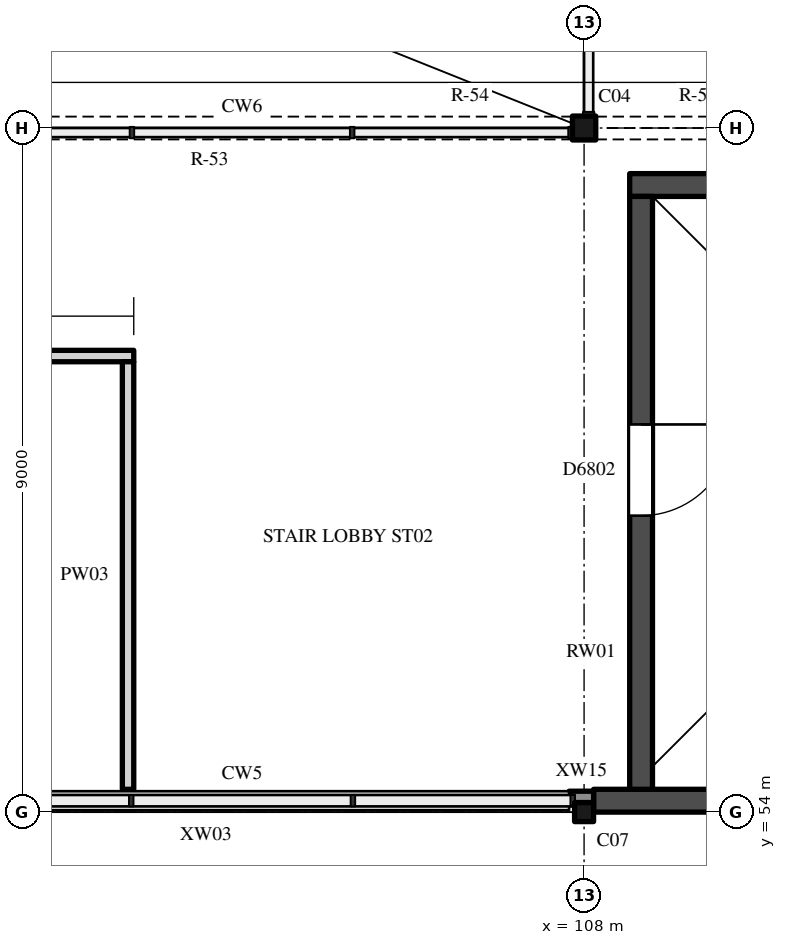
"""IFC4 building model, lengths in metres.
Left out: names, types, materials, properties, quantities, classifications, styles, units other than length and angle.
Written with IfcOpenShell. Run it as: python <this file> out.ifc"""

import sys

from ifc_helpers import new_model, si_unit, direction, frame, frame_2d, origin, origin_2d, place, context, subcontext, project, spatial, polyline, rectangle, hollow_rectangle, i_section, outline, extrude, element, fill, save


model = new_model("IFC4")
c1 = context("Model", 3, precision=1e-05, world=origin(), true_north=direction((0.0, 1.0)))
c2 = subcontext(c1, "Body", "Model", "MODEL_VIEW")
j1 = project(units=[si_unit("LENGTHUNIT", "METRE"), si_unit("PLANEANGLEUNIT", "RADIAN")], contexts=[c1])
p1 = place(None, origin())
s1 = spatial("IfcSite", under=j1, at=p1, CompositionType="ELEMENT")
p2 = place(p1, origin())
s2 = spatial("IfcBuilding", under=s1, at=p2, CompositionType="ELEMENT")
p3 = place(p2, frame((0.0, 0.0, 36.0)))
s3 = spatial("IfcBuildingStorey", under=s2, at=p3, CompositionType="ELEMENT", Elevation=36.0)
p4 = place(p3, frame((108.0, 54.0, 0.0), z_axis=(0.0, 0.0, 1.0), x_axis=(1.0, 0.0, 0.0)))
e1 = element("IfcColumn", 1, at=p4, inside=s3, PredefinedType="COLUMN", context=c2, shape_type="SweptSolid", body=[
    extrude(hollow_rectangle(XDim=0.25, YDim=0.25, WallThickness=0.009, InnerFilletRadius=0.013, OuterFilletRadius=0.022, at=origin_2d()), origin(), (0.0, 0.0, 1.0), 8.0),
])
p5 = place(p3, frame((108.0, 63.0, 0.0), z_axis=(0.0, 0.0, 1.0), x_axis=(1.0, 0.0, 0.0)))
e2 = element("IfcColumn", 2, at=p5, inside=s3, PredefinedType="COLUMN", context=c2, shape_type="SweptSolid", body=[
    extrude(i_section(OverallWidth=0.307, OverallDepth=0.315, WebThickness=0.012, FlangeThickness=0.019, FilletRadius=0.017, at=origin_2d()), origin(), (0.0, 0.0, 1.0), 8.0),
])
p6 = place(p3, frame((108.125, 54.15, 0.0), z_axis=(0.0, 0.0, 1.0), x_axis=(1.0, 0.0, 0.0)))
e3 = element("IfcWall", 3, at=p6, inside=s3, PredefinedType="SHEAR", context=c2, shape_type="SweptSolid", body=[
    extrude(rectangle(XDim=8.575, YDim=0.3, at=frame_2d((4.288, 0.0))), origin(), (0.0, 0.0, 1.0), 7.864),
])
p7 = place(p3, frame((108.6, 62.25, 0.0), z_axis=(0.0, 0.0, 1.0), x_axis=(1.0, 0.0, 0.0)))
e4 = element("IfcWall", 4, at=p7, inside=s3, PredefinedType="SHEAR", context=c2, shape_type="SweptSolid", body=[
    extrude(rectangle(XDim=8.1, YDim=0.3, at=frame_2d((4.05, 0.0))), origin(), (0.0, 0.0, 1.0), 14.344),
])
p8 = place(p3, frame((108.75, 54.3, 0.0), z_axis=(0.0, 0.0, 1.0), x_axis=(0.0, 1.0, 0.0)))
e5 = element("IfcWall", 5, at=p8, inside=s3, PredefinedType="SHEAR", context=c2, shape_type="SweptSolid", body=[
    extrude(outline(polyline([(0.0, 0.0), (7.8, 0.0), (7.8, 14.224), (0.0, 7.984), (0.0, 0.0)])), frame((0.0, 0.15, 0.0), z_axis=(0.0, -1.0, 0.0), x_axis=(1.0, 0.0, 0.0)), (0.0, 0.0, 1.0), 0.3),
])
p9 = place(p8, frame((3.6, 0.0, 0.0)))
e6 = element("IfcOpeningElement", 6, at=p9, cuts=e5, PredefinedType="OPENING", context=c2, shape_type="SweptSolid", body=[
    extrude(rectangle(XDim=1.2, YDim=2.1, at=frame_2d((0.6, 1.05))), frame((0.0, 0.16, 0.0), z_axis=(0.0, -1.0, 0.0), x_axis=(1.0, 0.0, 0.0)), (0.0, 0.0, 1.0), 0.32),
])
p10 = place(p3, frame((99.161, 54.15, 0.0), z_axis=(0.0, 0.0, 1.0), x_axis=(1.0, 0.0, 0.0)))
e7 = element("IfcWall", 7, at=p10, inside=s3, PredefinedType="SOLIDWALL", context=c2, shape_type="SweptSolid", body=[
    extrude(rectangle(XDim=8.642, YDim=0.25, at=frame_2d((4.321, 0.0))), origin(), (0.0, 0.0, 1.0), 1.1),
])
p11 = place(p3, frame((107.803, 54.2, 0.0), z_axis=(0.0, 0.0, 1.0), x_axis=(1.0, 0.0, 0.0)))
e8 = element("IfcWall", 8, at=p11, inside=s3, PredefinedType="SOLIDWALL", context=c2, shape_type="SweptSolid", body=[
    extrude(rectangle(XDim=0.322, YDim=0.15, at=frame_2d((0.161, 0.0))), origin(), (0.0, 0.0, 1.0), 7.864),
])
p12 = place(p3, frame((54.15, 63.0, 15.2), z_axis=(0.0, 0.0, 1.0), x_axis=(1.0, 0.0, 0.0)))
e9 = element("IfcWall", 9, at=p12, inside=s3, PredefinedType="SOLIDWALL", context=c2, shape_type="SweptSolid", body=[
    extrude(rectangle(XDim=62.7, YDim=0.3, at=frame_2d((31.35, 0.0))), origin(), (0.0, 0.0, 1.0), 0.9),
])
p13 = place(p12, frame((0.15, 0.0, 0.15)))
e10 = element("IfcOpeningElement", 10, at=p13, cuts=e9, PredefinedType="OPENING", context=c2, shape_type="SweptSolid", body=[
    extrude(rectangle(XDim=2.4, YDim=0.6, at=frame_2d((1.2, 0.3))), frame((0.0, 0.16, 0.0), z_axis=(0.0, -1.0, 0.0), x_axis=(1.0, 0.0, 0.0)), (0.0, 0.0, 1.0), 0.32),
])
p14 = place(p12, frame((3.15, 0.0, 0.15)))
e11 = element("IfcOpeningElement", 11, at=p14, cuts=e9, PredefinedType="OPENING", context=c2, shape_type="SweptSolid", body=[
    extrude(rectangle(XDim=2.4, YDim=0.6, at=frame_2d((1.2, 0.3))), frame((0.0, 0.16, 0.0), z_axis=(0.0, -1.0, 0.0), x_axis=(1.0, 0.0, 0.0)), (0.0, 0.0, 1.0), 0.32),
])
p15 = place(p12, frame((6.15, 0.0, 0.15)))
e12 = element("IfcOpeningElement", 12, at=p15, cuts=e9, PredefinedType="OPENING", context=c2, shape_type="SweptSolid", body=[
    extrude(rectangle(XDim=2.4, YDim=0.6, at=frame_2d((1.2, 0.3))), frame((0.0, 0.16, 0.0), z_axis=(0.0, -1.0, 0.0), x_axis=(1.0, 0.0, 0.0)), (0.0, 0.0, 1.0), 0.32),
])
p16 = place(p12, frame((9.15, 0.0, 0.15)))
e13 = element("IfcOpeningElement", 13, at=p16, cuts=e9, PredefinedType="OPENING", context=c2, shape_type="SweptSolid", body=[
    extrude(rectangle(XDim=2.4, YDim=0.6, at=frame_2d((1.2, 0.3))), frame((0.0, 0.16, 0.0), z_axis=(0.0, -1.0, 0.0), x_axis=(1.0, 0.0, 0.0)), (0.0, 0.0, 1.0), 0.32),
])
p17 = place(p12, frame((12.15, 0.0, 0.15)))
e14 = element("IfcOpeningElement", 14, at=p17, cuts=e9, PredefinedType="OPENING", context=c2, shape_type="SweptSolid", body=[
    extrude(rectangle(XDim=2.4, YDim=0.6, at=frame_2d((1.2, 0.3))), frame((0.0, 0.16, 0.0), z_axis=(0.0, -1.0, 0.0), x_axis=(1.0, 0.0, 0.0)), (0.0, 0.0, 1.0), 0.32),
])
p18 = place(p12, frame((15.15, 0.0, 0.15)))
e15 = element("IfcOpeningElement", 15, at=p18, cuts=e9, PredefinedType="OPENING", context=c2, shape_type="SweptSolid", body=[
    extrude(rectangle(XDim=2.4, YDim=0.6, at=frame_2d((1.2, 0.3))), frame((0.0, 0.16, 0.0), z_axis=(0.0, -1.0, 0.0), x_axis=(1.0, 0.0, 0.0)), (0.0, 0.0, 1.0), 0.32),
])
p19 = place(p12, frame((18.15, 0.0, 0.15)))
e16 = element("IfcOpeningElement", 16, at=p19, cuts=e9, PredefinedType="OPENING", context=c2, shape_type="SweptSolid", body=[
    extrude(rectangle(XDim=2.4, YDim=0.6, at=frame_2d((1.2, 0.3))), frame((0.0, 0.16, 0.0), z_axis=(0.0, -1.0, 0.0), x_axis=(1.0, 0.0, 0.0)), (0.0, 0.0, 1.0), 0.32),
])
p20 = place(p12, frame((21.15, 0.0, 0.15)))
e17 = element("IfcOpeningElement", 17, at=p20, cuts=e9, PredefinedType="OPENING", context=c2, shape_type="SweptSolid", body=[
    extrude(rectangle(XDim=2.4, YDim=0.6, at=frame_2d((1.2, 0.3))), frame((0.0, 0.16, 0.0), z_axis=(0.0, -1.0, 0.0), x_axis=(1.0, 0.0, 0.0)), (0.0, 0.0, 1.0), 0.32),
])
p21 = place(p12, frame((24.15, 0.0, 0.15)))
e18 = element("IfcOpeningElement", 18, at=p21, cuts=e9, PredefinedType="OPENING", context=c2, shape_type="SweptSolid", body=[
    extrude(rectangle(XDim=2.4, YDim=0.6, at=frame_2d((1.2, 0.3))), frame((0.0, 0.16, 0.0), z_axis=(0.0, -1.0, 0.0), x_axis=(1.0, 0.0, 0.0)), (0.0, 0.0, 1.0), 0.32),
])
p22 = place(p12, frame((27.15, 0.0, 0.15)))
e19 = element("IfcOpeningElement", 19, at=p22, cuts=e9, PredefinedType="OPENING", context=c2, shape_type="SweptSolid", body=[
    extrude(rectangle(XDim=2.4, YDim=0.6, at=frame_2d((1.2, 0.3))), frame((0.0, 0.16, 0.0), z_axis=(0.0, -1.0, 0.0), x_axis=(1.0, 0.0, 0.0)), (0.0, 0.0, 1.0), 0.32),
])
p23 = place(p12, frame((30.15, 0.0, 0.15)))
e20 = element("IfcOpeningElement", 20, at=p23, cuts=e9, PredefinedType="OPENING", context=c2, shape_type="SweptSolid", body=[
    extrude(rectangle(XDim=2.4, YDim=0.6, at=frame_2d((1.2, 0.3))), frame((0.0, 0.16, 0.0), z_axis=(0.0, -1.0, 0.0), x_axis=(1.0, 0.0, 0.0)), (0.0, 0.0, 1.0), 0.32),
])
p24 = place(p12, frame((33.15, 0.0, 0.15)))
e21 = element("IfcOpeningElement", 21, at=p24, cuts=e9, PredefinedType="OPENING", context=c2, shape_type="SweptSolid", body=[
    extrude(rectangle(XDim=2.4, YDim=0.6, at=frame_2d((1.2, 0.3))), frame((0.0, 0.16, 0.0), z_axis=(0.0, -1.0, 0.0), x_axis=(1.0, 0.0, 0.0)), (0.0, 0.0, 1.0), 0.32),
])
p25 = place(p12, frame((36.15, 0.0, 0.15)))
e22 = element("IfcOpeningElement", 22, at=p25, cuts=e9, PredefinedType="OPENING", context=c2, shape_type="SweptSolid", body=[
    extrude(rectangle(XDim=2.4, YDim=0.6, at=frame_2d((1.2, 0.3))), frame((0.0, 0.16, 0.0), z_axis=(0.0, -1.0, 0.0), x_axis=(1.0, 0.0, 0.0)), (0.0, 0.0, 1.0), 0.32),
])
p26 = place(p12, frame((39.15, 0.0, 0.15)))
e23 = element("IfcOpeningElement", 23, at=p26, cuts=e9, PredefinedType="OPENING", context=c2, shape_type="SweptSolid", body=[
    extrude(rectangle(XDim=2.4, YDim=0.6, at=frame_2d((1.2, 0.3))), frame((0.0, 0.16, 0.0), z_axis=(0.0, -1.0, 0.0), x_axis=(1.0, 0.0, 0.0)), (0.0, 0.0, 1.0), 0.32),
])
p27 = place(p12, frame((42.15, 0.0, 0.15)))
e24 = element("IfcOpeningElement", 24, at=p27, cuts=e9, PredefinedType="OPENING", context=c2, shape_type="SweptSolid", body=[
    extrude(rectangle(XDim=2.4, YDim=0.6, at=frame_2d((1.2, 0.3))), frame((0.0, 0.16, 0.0), z_axis=(0.0, -1.0, 0.0), x_axis=(1.0, 0.0, 0.0)), (0.0, 0.0, 1.0), 0.32),
])
p28 = place(p12, frame((45.15, 0.0, 0.15)))
e25 = element("IfcOpeningElement", 25, at=p28, cuts=e9, PredefinedType="OPENING", context=c2, shape_type="SweptSolid", body=[
    extrude(rectangle(XDim=2.4, YDim=0.6, at=frame_2d((1.2, 0.3))), frame((0.0, 0.16, 0.0), z_axis=(0.0, -1.0, 0.0), x_axis=(1.0, 0.0, 0.0)), (0.0, 0.0, 1.0), 0.32),
])
p29 = place(p12, frame((48.15, 0.0, 0.15)))
e26 = element("IfcOpeningElement", 26, at=p29, cuts=e9, PredefinedType="OPENING", context=c2, shape_type="SweptSolid", body=[
    extrude(rectangle(XDim=2.4, YDim=0.6, at=frame_2d((1.2, 0.3))), frame((0.0, 0.16, 0.0), z_axis=(0.0, -1.0, 0.0), x_axis=(1.0, 0.0, 0.0)), (0.0, 0.0, 1.0), 0.32),
])
p30 = place(p12, frame((51.15, 0.0, 0.15)))
e27 = element("IfcOpeningElement", 27, at=p30, cuts=e9, PredefinedType="OPENING", context=c2, shape_type="SweptSolid", body=[
    extrude(rectangle(XDim=2.4, YDim=0.6, at=frame_2d((1.2, 0.3))), frame((0.0, 0.16, 0.0), z_axis=(0.0, -1.0, 0.0), x_axis=(1.0, 0.0, 0.0)), (0.0, 0.0, 1.0), 0.32),
])
p31 = place(p12, frame((54.15, 0.0, 0.15)))
e28 = element("IfcOpeningElement", 28, at=p31, cuts=e9, PredefinedType="OPENING", context=c2, shape_type="SweptSolid", body=[
    extrude(rectangle(XDim=2.4, YDim=0.6, at=frame_2d((1.2, 0.3))), frame((0.0, 0.16, 0.0), z_axis=(0.0, -1.0, 0.0), x_axis=(1.0, 0.0, 0.0)), (0.0, 0.0, 1.0), 0.32),
])
p32 = place(p12, frame((57.15, 0.0, 0.15)))
e29 = element("IfcOpeningElement", 29, at=p32, cuts=e9, PredefinedType="OPENING", context=c2, shape_type="SweptSolid", body=[
    extrude(rectangle(XDim=2.4, YDim=0.6, at=frame_2d((1.2, 0.3))), frame((0.0, 0.16, 0.0), z_axis=(0.0, -1.0, 0.0), x_axis=(1.0, 0.0, 0.0)), (0.0, 0.0, 1.0), 0.32),
])
p33 = place(p12, frame((60.15, 0.0, 0.15)))
e30 = element("IfcOpeningElement", 30, at=p33, cuts=e9, PredefinedType="OPENING", context=c2, shape_type="SweptSolid", body=[
    extrude(rectangle(XDim=2.4, YDim=0.6, at=frame_2d((1.2, 0.3))), frame((0.0, 0.16, 0.0), z_axis=(0.0, -1.0, 0.0), x_axis=(1.0, 0.0, 0.0)), (0.0, 0.0, 1.0), 0.32),
])
p34 = place(p3, frame((68.925, 60.0, 0.0), z_axis=(0.0, 0.0, 1.0), x_axis=(1.0, 0.0, 0.0)))
e31 = element("IfcWall", 31, at=p34, inside=s3, PredefinedType="PARTITIONING", context=c2, shape_type="SweptSolid", body=[
    extrude(rectangle(XDim=33.15, YDim=0.15, at=frame_2d((16.575, 0.0))), origin(), (0.0, 0.0, 1.0), 7.744),
])
p35 = place(p34, frame((15.625, 0.0, 0.0)))
e32 = element("IfcOpeningElement", 32, at=p35, cuts=e31, PredefinedType="OPENING", context=c2, shape_type="SweptSolid", body=[
    extrude(rectangle(XDim=1.8, YDim=2.4, at=frame_2d((0.9, 1.2))), frame((0.0, 0.085, 0.0), z_axis=(0.0, -1.0, 0.0), x_axis=(1.0, 0.0, 0.0)), (0.0, 0.0, 1.0), 0.17),
])
p36 = place(p3, frame((102.0, 54.3, 0.0), z_axis=(0.0, 0.0, 1.0), x_axis=(0.0, 1.0, 0.0)))
e33 = element("IfcWall", 33, at=p36, inside=s3, PredefinedType="PARTITIONING", context=c2, shape_type="SweptSolid", body=[
    extrude(rectangle(XDim=5.625, YDim=0.15, at=frame_2d((2.812, 0.0))), origin(), (0.0, 0.0, 1.0), 7.744),
])
p37 = place(p9, origin())
e34 = element("IfcDoor", 34, at=p37, inside=s3, OperationType="SINGLE_SWING_RIGHT", PredefinedType="DOOR", context=c2, shape_type="SweptSolid", body=[
    extrude(rectangle(XDim=1.2, YDim=2.1, at=frame_2d((0.6, 1.05))), frame((0.0, 0.025, 0.0), z_axis=(0.0, -1.0, 0.0), x_axis=(1.0, 0.0, 0.0)), (0.0, 0.0, 1.0), 0.05),
])
fill(e6, e34)
p38 = place(p28, origin())
e35 = element("IfcWindow", 35, at=p38, inside=s3, PartitioningType="SINGLE_PANEL", PredefinedType="SKYLIGHT", context=c2, shape_type="SweptSolid", body=[
    extrude(rectangle(XDim=2.4, YDim=0.6, at=frame_2d((1.2, 0.3))), frame((0.0, 0.03, 0.0), z_axis=(0.0, -1.0, 0.0), x_axis=(1.0, 0.0, 0.0)), (0.0, 0.0, 1.0), 0.06),
])
fill(e25, e35)
p39 = place(p29, origin())
e36 = element("IfcWindow", 36, at=p39, inside=s3, PartitioningType="SINGLE_PANEL", PredefinedType="SKYLIGHT", context=c2, shape_type="SweptSolid", body=[
    extrude(rectangle(XDim=2.4, YDim=0.6, at=frame_2d((1.2, 0.3))), frame((0.0, 0.03, 0.0), z_axis=(0.0, -1.0, 0.0), x_axis=(1.0, 0.0, 0.0)), (0.0, 0.0, 1.0), 0.06),
])
fill(e26, e36)
p40 = place(p30, origin())
e37 = element("IfcWindow", 37, at=p40, inside=s3, PartitioningType="SINGLE_PANEL", PredefinedType="SKYLIGHT", context=c2, shape_type="SweptSolid", body=[
    extrude(rectangle(XDim=2.4, YDim=0.6, at=frame_2d((1.2, 0.3))), frame((0.0, 0.03, 0.0), z_axis=(0.0, -1.0, 0.0), x_axis=(1.0, 0.0, 0.0)), (0.0, 0.0, 1.0), 0.06),
])
fill(e27, e37)
p41 = place(p31, origin())
e38 = element("IfcWindow", 38, at=p41, inside=s3, PartitioningType="SINGLE_PANEL", PredefinedType="SKYLIGHT", context=c2, shape_type="SweptSolid", body=[
    extrude(rectangle(XDim=2.4, YDim=0.6, at=frame_2d((1.2, 0.3))), frame((0.0, 0.03, 0.0), z_axis=(0.0, -1.0, 0.0), x_axis=(1.0, 0.0, 0.0)), (0.0, 0.0, 1.0), 0.06),
])
fill(e28, e38)
save(model, sys.argv[1])
